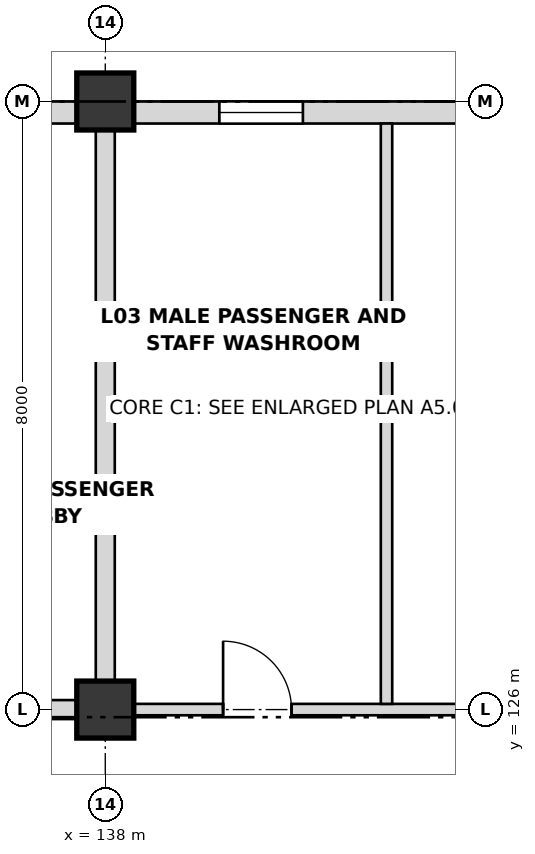
"""IFC4 building model, lengths in metres.
Left out: names, types, materials, properties, quantities, classifications, styles, units other than length and angle.
Written with IfcOpenShell. Run it as: python <this file> out.ifc"""

import sys

from ifc_helpers import new_model, si_unit, direction, frame, frame_2d, origin, origin_2d, place, context, subcontext, project, spatial, rectangle, extrude, element, fill, save


model = new_model("IFC4")
c1 = context("Model", 3, precision=1e-05, world=origin(), true_north=direction((0.0, 1.0)))
c2 = subcontext(c1, "Body", "Model", "MODEL_VIEW")
j1 = project(units=[si_unit("LENGTHUNIT", "METRE"), si_unit("PLANEANGLEUNIT", "RADIAN")], contexts=[c1])
p1 = place(None, origin())
s1 = spatial("IfcSite", under=j1, at=p1, CompositionType="ELEMENT")
p2 = place(p1, origin())
s2 = spatial("IfcBuilding", under=s1, at=p2, CompositionType="ELEMENT")
p3 = place(p2, frame((0.0, 0.0, 14.4)))
s3 = spatial("IfcBuildingStorey", under=s2, at=p3, CompositionType="ELEMENT", Elevation=14.4)
for number, where, z_axis, x_axis in (
    (1, (138.0, 126.0, 0.0), (0.0, 0.0, 1.0), (1.0, 0.0, 0.0)),
    (2, (138.0, 134.0, 0.0), (0.0, 0.0, 1.0), (1.0, 0.0, 0.0)),
):
    element("IfcColumn", number, at=place(p3, frame(where, z_axis=z_axis, x_axis=x_axis)), inside=s3, PredefinedType="COLUMN", context=c2, shape_type="SweptSolid", body=[
        extrude(rectangle(XDim=0.75, YDim=0.75, at=origin_2d()), origin(), (0.0, 0.0, 1.0), 4.2),
    ])
p4 = place(p3, frame((128.37, 133.855, 0.0), z_axis=(0.0, 0.0, 1.0), x_axis=(1.0, 0.0, 0.0)))
e3 = element("IfcWall", 3, at=p4, inside=s3, PredefinedType="SOLIDWALL", context=c2, shape_type="SweptSolid", body=[
    extrude(rectangle(XDim=9.26, YDim=0.29, at=frame_2d((4.63, 0.0))), origin(), (0.0, 0.0, 1.0), 3.178),
])
p5 = place(p4, frame((3.38, 0.0, 1.05)))
e4 = element("IfcOpeningElement", 4, at=p5, cuts=e3, PredefinedType="OPENING", context=c2, shape_type="SweptSolid", body=[
    extrude(rectangle(XDim=0.9, YDim=1.15, at=frame_2d((0.45, 0.575))), frame((0.0, 0.155, 0.0), z_axis=(0.0, -1.0, 0.0), x_axis=(1.0, 0.0, 0.0)), (0.0, 0.0, 1.0), 0.31),
])
p6 = place(p3, frame((138.37, 133.855, 0.0), z_axis=(0.0, 0.0, 1.0), x_axis=(1.0, 0.0, 0.0)))
e5 = element("IfcWall", 5, at=p6, inside=s3, PredefinedType="SOLIDWALL", context=c2, shape_type="SweptSolid", body=[
    extrude(rectangle(XDim=9.26, YDim=0.29, at=frame_2d((4.63, 0.0))), origin(), (0.0, 0.0, 1.0), 3.178),
])
p7 = place(p6, frame((1.13, 0.0, 1.25)))
e6 = element("IfcOpeningElement", 6, at=p7, cuts=e5, PredefinedType="OPENING", context=c2, shape_type="SweptSolid", body=[
    extrude(rectangle(XDim=1.1, YDim=1.15, at=frame_2d((0.55, 0.575))), frame((0.0, 0.155, 0.0), z_axis=(0.0, -1.0, 0.0), x_axis=(1.0, 0.0, 0.0)), (0.0, 0.0, 1.0), 0.31),
])
p8 = place(p6, frame((4.43, 0.0, 1.25)))
e7 = element("IfcOpeningElement", 7, at=p8, cuts=e5, PredefinedType="OPENING", context=c2, shape_type="SweptSolid", body=[
    extrude(rectangle(XDim=1.3, YDim=1.15, at=frame_2d((0.65, 0.575))), frame((0.0, 0.155, 0.0), z_axis=(0.0, -1.0, 0.0), x_axis=(1.0, 0.0, 0.0)), (0.0, 0.0, 1.0), 0.31),
])
p9 = place(p6, frame((7.63, 0.0, 1.25)))
e8 = element("IfcOpeningElement", 8, at=p9, cuts=e5, PredefinedType="OPENING", context=c2, shape_type="SweptSolid", body=[
    extrude(rectangle(XDim=0.9, YDim=1.4, at=frame_2d((0.45, 0.7))), frame((0.0, 0.155, 0.0), z_axis=(0.0, -1.0, 0.0), x_axis=(1.0, 0.0, 0.0)), (0.0, 0.0, 1.0), 0.31),
])
p10 = place(p3, frame((128.38, 126.0, 0.0), z_axis=(0.0, 0.0, 1.0), x_axis=(1.0, 0.0, 0.0)))
e9 = element("IfcWall", 9, at=p10, inside=s3, PredefinedType="PARTITIONING", context=c2, shape_type="SweptSolid", body=[
    extrude(rectangle(XDim=9.24, YDim=0.25, at=frame_2d((4.62, 0.0))), origin(), (0.0, 0.0, 1.0), 3.078),
])
p11 = place(p10, frame((1.795, 0.0, 0.0)))
e10 = element("IfcOpeningElement", 10, at=p11, cuts=e9, PredefinedType="OPENING", context=c2, shape_type="SweptSolid", body=[
    extrude(rectangle(XDim=1.25, YDim=2.15, at=frame_2d((0.625, 1.075))), frame((0.0, 0.135, 0.0), z_axis=(0.0, -1.0, 0.0), x_axis=(1.0, 0.0, 0.0)), (0.0, 0.0, 1.0), 0.27),
])
p12 = place(p10, frame((6.27, 0.0, 0.0)))
e11 = element("IfcOpeningElement", 11, at=p12, cuts=e9, PredefinedType="OPENING", context=c2, shape_type="SweptSolid", body=[
    extrude(rectangle(XDim=1.1, YDim=2.15, at=frame_2d((0.55, 1.075))), frame((0.0, 0.135, 0.0), z_axis=(0.0, -1.0, 0.0), x_axis=(1.0, 0.0, 0.0)), (0.0, 0.0, 1.0), 0.27),
])
p13 = place(p3, frame((138.38, 126.0, 0.0), z_axis=(0.0, 0.0, 1.0), x_axis=(1.0, 0.0, 0.0)))
e12 = element("IfcWall", 12, at=p13, inside=s3, PredefinedType="PARTITIONING", context=c2, shape_type="SweptSolid", body=[
    extrude(rectangle(XDim=9.24, YDim=0.15, at=frame_2d((4.62, 0.0))), origin(), (0.0, 0.0, 1.0), 3.078),
])
p14 = place(p13, frame((1.17, 0.0, 0.0)))
e13 = element("IfcOpeningElement", 13, at=p14, cuts=e12, PredefinedType="OPENING", context=c2, shape_type="SweptSolid", body=[
    extrude(rectangle(XDim=0.9, YDim=2.05, at=frame_2d((0.45, 1.025))), frame((0.0, 0.085, 0.0), z_axis=(0.0, -1.0, 0.0), x_axis=(1.0, 0.0, 0.0)), (0.0, 0.0, 1.0), 0.17),
])
p15 = place(p13, frame((4.545, 0.0, 0.0)))
e14 = element("IfcOpeningElement", 14, at=p15, cuts=e12, PredefinedType="OPENING", context=c2, shape_type="SweptSolid", body=[
    extrude(rectangle(XDim=0.95, YDim=2.05, at=frame_2d((0.475, 1.025))), frame((0.0, 0.085, 0.0), z_axis=(0.0, -1.0, 0.0), x_axis=(1.0, 0.0, 0.0)), (0.0, 0.0, 1.0), 0.17),
])
p16 = place(p13, frame((7.52, 0.0, 0.0)))
e15 = element("IfcOpeningElement", 15, at=p16, cuts=e12, PredefinedType="OPENING", context=c2, shape_type="SweptSolid", body=[
    extrude(rectangle(XDim=1.0, YDim=2.05, at=frame_2d((0.5, 1.025))), frame((0.0, 0.085, 0.0), z_axis=(0.0, -1.0, 0.0), x_axis=(1.0, 0.0, 0.0)), (0.0, 0.0, 1.0), 0.17),
])
p17 = place(p3, frame((141.7, 126.075, 0.0), z_axis=(0.0, 0.0, 1.0), x_axis=(0.0, 1.0, 0.0)))
e16 = element("IfcWall", 16, at=p17, inside=s3, PredefinedType="PARTITIONING", context=c2, shape_type="SweptSolid", body=[
    extrude(rectangle(XDim=7.635, YDim=0.15, at=frame_2d((3.817, 0.0))), origin(), (0.0, 0.0, 1.0), 3.078),
])
p18 = place(p3, frame((138.0, 126.38, 0.0), z_axis=(0.0, 0.0, 1.0), x_axis=(0.0, 1.0, 0.0)))
e17 = element("IfcWall", 17, at=p18, inside=s3, PredefinedType="PARTITIONING", context=c2, shape_type="SweptSolid", body=[
    extrude(rectangle(XDim=7.24, YDim=0.25, at=frame_2d((3.62, 0.0))), origin(), (0.0, 0.0, 1.0), 3.178),
])
p19 = place(p7, origin())
e18 = element("IfcWindow", 18, at=p19, inside=s3, PartitioningType="SINGLE_PANEL", PredefinedType="WINDOW", context=c2, shape_type="SweptSolid", body=[
    extrude(rectangle(XDim=1.1, YDim=1.15, at=frame_2d((0.55, 0.575))), frame((0.0, 0.03, 0.0), z_axis=(0.0, -1.0, 0.0), x_axis=(1.0, 0.0, 0.0)), (0.0, 0.0, 1.0), 0.06),
])
fill(e6, e18)
p20 = place(p14, origin())
e19 = element("IfcDoor", 19, at=p20, inside=s3, OperationType="SINGLE_SWING_LEFT", PredefinedType="DOOR", context=c2, shape_type="SweptSolid", body=[
    extrude(rectangle(XDim=0.9, YDim=2.05, at=frame_2d((0.45, 1.025))), frame((0.0, 0.025, 0.0), z_axis=(0.0, -1.0, 0.0), x_axis=(1.0, 0.0, 0.0)), (0.0, 0.0, 1.0), 0.05),
])
fill(e13, e19)
save(model, sys.argv[1])
